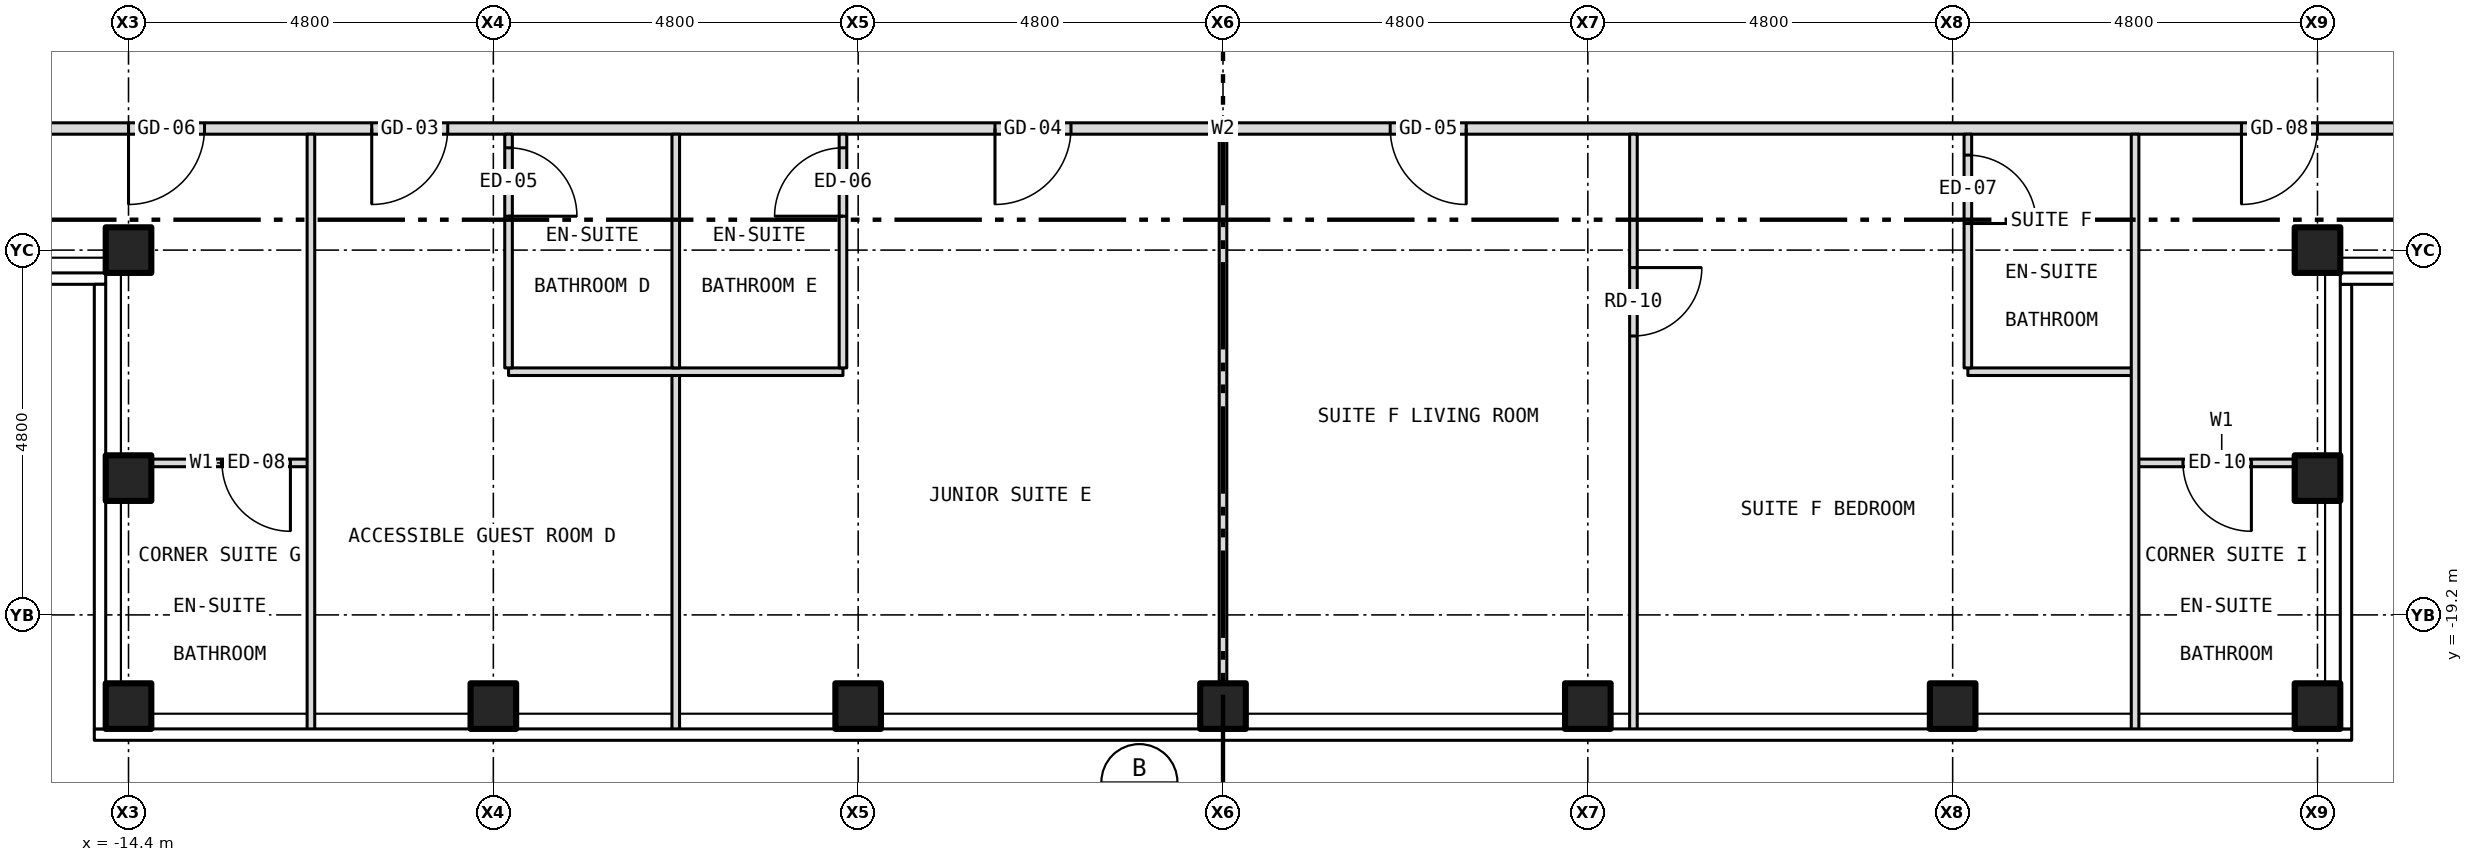
"""IFC4 building model, lengths in metres.
Left out: names, types, materials, properties, quantities, classifications, styles, units other than length and angle.
Written with IfcOpenShell. Run it as: python <this file> out.ifc"""

import sys

from ifc_helpers import new_model, si_unit, direction, frame, frame_2d, origin, origin_2d, place, context, subcontext, project, spatial, rectangle, hollow_rectangle, extrude, element, fill, save


model = new_model("IFC4")
c1 = context("Model", 3, precision=1e-05, world=origin(), true_north=direction((0.0, 1.0)))
c2 = subcontext(c1, "Body", "Model", "MODEL_VIEW")
j1 = project(units=[si_unit("LENGTHUNIT", "METRE"), si_unit("PLANEANGLEUNIT", "RADIAN")], contexts=[c1])
p1 = place(None, origin())
s1 = spatial("IfcSite", under=j1, at=p1, CompositionType="ELEMENT")
p2 = place(p1, origin())
s2 = spatial("IfcBuilding", under=s1, at=p2, CompositionType="ELEMENT")
p3 = place(p2, frame((0.0, 0.0, 241.0)))
s3 = spatial("IfcBuildingStorey", under=s2, at=p3, CompositionType="ELEMENT", Elevation=241.0)
for number, where, z_axis, x_axis in (
    (1, (-14.4, -20.4, -0.15), (0.0, 0.0, 1.0), (1.0, 0.0, 0.0)),
    (2, (-9.6, -20.4, -0.15), (0.0, 0.0, 1.0), (1.0, 0.0, 0.0)),
    (3, (-4.8, -20.4, -0.15), (0.0, 0.0, 1.0), (1.0, 0.0, 0.0)),
    (4, (0.0, -20.4, -0.15), (0.0, 0.0, 1.0), (1.0, 0.0, 0.0)),
    (5, (4.8, -20.4, -0.15), (0.0, 0.0, 1.0), (1.0, 0.0, 0.0)),
    (6, (9.6, -20.4, -0.15), (0.0, 0.0, 1.0), (1.0, 0.0, 0.0)),
    (7, (14.4, -20.4, -0.15), (0.0, 0.0, 1.0), (1.0, 0.0, 0.0)),
    (8, (-14.4, -14.4, -0.15), (0.0, 0.0, 1.0), (1.0, 0.0, 0.0)),
    (9, (-14.4, -17.4, -0.15), (0.0, 0.0, 1.0), (1.0, 0.0, 0.0)),
    (10, (14.4, -14.4, -0.15), (0.0, 0.0, 1.0), (1.0, 0.0, 0.0)),
    (11, (14.4, -17.4, -0.15), (0.0, 0.0, 1.0), (1.0, 0.0, 0.0)),
):
    element("IfcColumn", number, at=place(p3, frame(where, z_axis=z_axis, x_axis=x_axis)), inside=s3, PredefinedType="COLUMN", context=c2, shape_type="SweptSolid", body=[
        extrude(hollow_rectangle(XDim=0.6, YDim=0.6, WallThickness=0.03, at=origin_2d()), origin(), (0.0, 0.0, 1.0), 3.5),
    ])
p4 = place(p3, frame((-14.28, -17.2, 0.0), z_axis=(0.0, 0.0, 1.0), x_axis=(1.0, 0.0, 0.0)))
e12 = element("IfcWall", 12, at=p4, inside=s3, PredefinedType="PARTITIONING", context=c2, shape_type="SweptSolid", body=[
    extrude(rectangle(XDim=2.28, YDim=0.1, at=frame_2d((1.14, 0.0))), origin(), (0.0, 0.0, 1.0), 3.35),
])
p5 = place(p4, frame((1.11, 0.0, 0.0)))
e13 = element("IfcOpeningElement", 13, at=p5, cuts=e12, PredefinedType="OPENING", context=c2, shape_type="SweptSolid", body=[
    extrude(rectangle(XDim=0.9, YDim=2.1, at=frame_2d((0.45, 1.05))), frame((0.0, 0.062, 0.0), z_axis=(0.0, -1.0, 0.0), x_axis=(1.0, 0.0, 0.0)), (0.0, 0.0, 1.0), 0.124),
])
p6 = place(p3, frame((12.0, -17.2, 0.0), z_axis=(0.0, 0.0, 1.0), x_axis=(1.0, 0.0, 0.0)))
e14 = element("IfcWall", 14, at=p6, inside=s3, PredefinedType="PARTITIONING", context=c2, shape_type="SweptSolid", body=[
    extrude(rectangle(XDim=2.28, YDim=0.1, at=frame_2d((1.14, 0.0))), origin(), (0.0, 0.0, 1.0), 3.35),
])
p7 = place(p6, frame((0.63, 0.0, 0.0)))
e15 = element("IfcOpeningElement", 15, at=p7, cuts=e14, PredefinedType="OPENING", context=c2, shape_type="SweptSolid", body=[
    extrude(rectangle(XDim=0.9, YDim=2.1, at=frame_2d((0.45, 1.05))), frame((0.0, 0.062, 0.0), z_axis=(0.0, -1.0, 0.0), x_axis=(1.0, 0.0, 0.0)), (0.0, 0.0, 1.0), 0.124),
])
p8 = place(p3, frame((-9.4, -16.0, 0.0), z_axis=(0.0, 0.0, 1.0), x_axis=(1.0, 0.0, 0.0)))
e16 = element("IfcWall", 16, at=p8, inside=s3, PredefinedType="PARTITIONING", context=c2, shape_type="SweptSolid", body=[
    extrude(rectangle(XDim=4.4, YDim=0.1, at=frame_2d((2.2, 0.0))), origin(), (0.0, 0.0, 1.0), 3.35),
])
p9 = place(p3, frame((9.8, -16.0, 0.0), z_axis=(0.0, 0.0, 1.0), x_axis=(1.0, 0.0, 0.0)))
e17 = element("IfcWall", 17, at=p9, inside=s3, PredefinedType="PARTITIONING", context=c2, shape_type="SweptSolid", body=[
    extrude(rectangle(XDim=2.2, YDim=0.1, at=frame_2d((1.1, 0.0))), origin(), (0.0, 0.0, 1.0), 3.35),
])
p10 = place(p3, frame((-15.8, -12.8, 0.0), z_axis=(0.0, 0.0, 1.0), x_axis=(1.0, 0.0, 0.0)))
e18 = element("IfcWall", 18, at=p10, inside=s3, PredefinedType="PARTITIONING", context=c2, shape_type="SweptSolid", body=[
    extrude(rectangle(XDim=31.6, YDim=0.15, at=frame_2d((15.8, 0.0))), origin(), (0.0, 0.0, 1.0), 3.35),
])
p11 = place(p10, frame((4.6, 0.0, 0.0)))
e19 = element("IfcOpeningElement", 19, at=p11, cuts=e18, PredefinedType="OPENING", context=c2, shape_type="SweptSolid", body=[
    extrude(rectangle(XDim=1.0, YDim=2.1, at=frame_2d((0.5, 1.05))), frame((0.0, 0.087, 0.0), z_axis=(0.0, -1.0, 0.0), x_axis=(1.0, 0.0, 0.0)), (0.0, 0.0, 1.0), 0.174),
])
p12 = place(p10, frame((12.8, 0.0, 0.0)))
e20 = element("IfcOpeningElement", 20, at=p12, cuts=e18, PredefinedType="OPENING", context=c2, shape_type="SweptSolid", body=[
    extrude(rectangle(XDim=1.0, YDim=2.1, at=frame_2d((0.5, 1.05))), frame((0.0, 0.087, 0.0), z_axis=(0.0, -1.0, 0.0), x_axis=(1.0, 0.0, 0.0)), (0.0, 0.0, 1.0), 0.174),
])
p13 = place(p10, frame((18.0, 0.0, 0.0)))
e21 = element("IfcOpeningElement", 21, at=p13, cuts=e18, PredefinedType="OPENING", context=c2, shape_type="SweptSolid", body=[
    extrude(rectangle(XDim=1.0, YDim=2.1, at=frame_2d((0.5, 1.05))), frame((0.0, 0.087, 0.0), z_axis=(0.0, -1.0, 0.0), x_axis=(1.0, 0.0, 0.0)), (0.0, 0.0, 1.0), 0.174),
])
p14 = place(p10, frame((1.4, 0.0, 0.0)))
e22 = element("IfcOpeningElement", 22, at=p14, cuts=e18, PredefinedType="OPENING", context=c2, shape_type="SweptSolid", body=[
    extrude(rectangle(XDim=1.0, YDim=2.1, at=frame_2d((0.5, 1.05))), frame((0.0, 0.087, 0.0), z_axis=(0.0, -1.0, 0.0), x_axis=(1.0, 0.0, 0.0)), (0.0, 0.0, 1.0), 0.174),
])
p15 = place(p10, frame((29.2, 0.0, 0.0)))
e23 = element("IfcOpeningElement", 23, at=p15, cuts=e18, PredefinedType="OPENING", context=c2, shape_type="SweptSolid", body=[
    extrude(rectangle(XDim=1.0, YDim=2.1, at=frame_2d((0.5, 1.05))), frame((0.0, 0.087, 0.0), z_axis=(0.0, -1.0, 0.0), x_axis=(1.0, 0.0, 0.0)), (0.0, 0.0, 1.0), 0.174),
])
p16 = place(p3, frame((-12.0, -20.73, 0.0), z_axis=(0.0, 0.0, 1.0), x_axis=(0.0, 1.0, 0.0)))
e24 = element("IfcWall", 24, at=p16, inside=s3, PredefinedType="PARTITIONING", context=c2, shape_type="SweptSolid", body=[
    extrude(rectangle(XDim=7.855, YDim=0.1, at=frame_2d((3.927, 0.0))), origin(), (0.0, 0.0, 1.0), 3.35),
])
p17 = place(p3, frame((-9.4, -15.95, 0.0), z_axis=(0.0, 0.0, 1.0), x_axis=(0.0, 1.0, 0.0)))
e25 = element("IfcWall", 25, at=p17, inside=s3, PredefinedType="PARTITIONING", context=c2, shape_type="SweptSolid", body=[
    extrude(rectangle(XDim=3.075, YDim=0.1, at=frame_2d((1.538, 0.0))), origin(), (0.0, 0.0, 1.0), 2.728),
])
p18 = place(p17, frame((1.996, 0.0, 0.0)))
e26 = element("IfcOpeningElement", 26, at=p18, cuts=e25, PredefinedType="OPENING", context=c2, shape_type="SweptSolid", body=[
    extrude(rectangle(XDim=0.9, YDim=2.1, at=frame_2d((0.45, 1.05))), frame((0.0, 0.062, 0.0), z_axis=(0.0, -1.0, 0.0), x_axis=(1.0, 0.0, 0.0)), (0.0, 0.0, 1.0), 0.124),
])
p19 = place(p3, frame((-7.2, -20.73, 0.0), z_axis=(0.0, 0.0, 1.0), x_axis=(0.0, 1.0, 0.0)))
e27 = element("IfcWall", 27, at=p19, inside=s3, PredefinedType="PARTITIONING", context=c2, shape_type="SweptSolid", body=[
    extrude(rectangle(XDim=4.68, YDim=0.1, at=frame_2d((2.34, 0.0))), origin(), (0.0, 0.0, 1.0), 3.35),
])
p20 = place(p3, frame((-7.2, -15.95, 0.0), z_axis=(0.0, 0.0, 1.0), x_axis=(0.0, 1.0, 0.0)))
e28 = element("IfcWall", 28, at=p20, inside=s3, PredefinedType="PARTITIONING", context=c2, shape_type="SweptSolid", body=[
    extrude(rectangle(XDim=3.075, YDim=0.1, at=frame_2d((1.538, 0.0))), origin(), (0.0, 0.0, 1.0), 3.35),
])
p21 = place(p3, frame((-5.0, -15.95, 0.0), z_axis=(0.0, 0.0, 1.0), x_axis=(0.0, 1.0, 0.0)))
e29 = element("IfcWall", 29, at=p21, inside=s3, PredefinedType="PARTITIONING", context=c2, shape_type="SweptSolid", body=[
    extrude(rectangle(XDim=3.075, YDim=0.1, at=frame_2d((1.538, 0.0))), origin(), (0.0, 0.0, 1.0), 3.35),
])
p22 = place(p21, frame((1.996, 0.0, 0.0)))
e30 = element("IfcOpeningElement", 30, at=p22, cuts=e29, PredefinedType="OPENING", context=c2, shape_type="SweptSolid", body=[
    extrude(rectangle(XDim=0.9, YDim=2.1, at=frame_2d((0.45, 1.05))), frame((0.0, 0.062, 0.0), z_axis=(0.0, -1.0, 0.0), x_axis=(1.0, 0.0, 0.0)), (0.0, 0.0, 1.0), 0.124),
])
p23 = place(p3, frame((0.0, -20.28, 0.0), z_axis=(0.0, 0.0, 1.0), x_axis=(0.0, 1.0, 0.0)))
e31 = element("IfcWall", 31, at=p23, inside=s3, PredefinedType="PARTITIONING", context=c2, shape_type="SweptSolid", body=[
    extrude(rectangle(XDim=7.405, YDim=0.1, at=frame_2d((3.703, 0.0))), origin(), (0.0, 0.0, 1.0), 2.728),
])
p24 = place(p3, frame((5.4, -20.73, 0.0), z_axis=(0.0, 0.0, 1.0), x_axis=(0.0, 1.0, 0.0)))
e32 = element("IfcWall", 32, at=p24, inside=s3, PredefinedType="PARTITIONING", context=c2, shape_type="SweptSolid", body=[
    extrude(rectangle(XDim=7.855, YDim=0.1, at=frame_2d((3.927, 0.0))), origin(), (0.0, 0.0, 1.0), 3.35),
])
p25 = place(p24, frame((5.2, 0.0, 0.0)))
e33 = element("IfcOpeningElement", 33, at=p25, cuts=e32, PredefinedType="OPENING", context=c2, shape_type="SweptSolid", body=[
    extrude(rectangle(XDim=0.9, YDim=2.1, at=frame_2d((0.45, 1.05))), frame((0.0, 0.062, 0.0), z_axis=(0.0, -1.0, 0.0), x_axis=(1.0, 0.0, 0.0)), (0.0, 0.0, 1.0), 0.124),
])
p26 = place(p3, frame((9.8, -15.95, 0.0), z_axis=(0.0, 0.0, 1.0), x_axis=(0.0, 1.0, 0.0)))
e34 = element("IfcWall", 34, at=p26, inside=s3, PredefinedType="PARTITIONING", context=c2, shape_type="SweptSolid", body=[
    extrude(rectangle(XDim=3.075, YDim=0.1, at=frame_2d((1.538, 0.0))), origin(), (0.0, 0.0, 1.0), 2.728),
])
p27 = place(p26, frame((1.9, 0.0, 0.0)))
e35 = element("IfcOpeningElement", 35, at=p27, cuts=e34, PredefinedType="OPENING", context=c2, shape_type="SweptSolid", body=[
    extrude(rectangle(XDim=0.9, YDim=2.1, at=frame_2d((0.45, 1.05))), frame((0.0, 0.062, 0.0), z_axis=(0.0, -1.0, 0.0), x_axis=(1.0, 0.0, 0.0)), (0.0, 0.0, 1.0), 0.124),
])
p28 = place(p3, frame((12.0, -20.73, 0.0), z_axis=(0.0, 0.0, 1.0), x_axis=(0.0, 1.0, 0.0)))
e36 = element("IfcWall", 36, at=p28, inside=s3, PredefinedType="PARTITIONING", context=c2, shape_type="SweptSolid", body=[
    extrude(rectangle(XDim=7.855, YDim=0.1, at=frame_2d((3.927, 0.0))), origin(), (0.0, 0.0, 1.0), 3.35),
])
p29 = place(p11, origin())
e37 = element("IfcDoor", 37, at=p29, inside=s3, OperationType="SINGLE_SWING_LEFT", PredefinedType="DOOR", context=c2, shape_type="SweptSolid", body=[
    extrude(rectangle(XDim=1.0, YDim=2.1, at=frame_2d((0.5, 1.05))), frame((0.0, 0.025, 0.0), z_axis=(0.0, -1.0, 0.0), x_axis=(1.0, 0.0, 0.0)), (0.0, 0.0, 1.0), 0.05),
])
fill(e19, e37)
p30 = place(p18, origin())
e38 = element("IfcDoor", 38, at=p30, inside=s3, OperationType="SINGLE_SWING_LEFT", PredefinedType="DOOR", context=c2, shape_type="SweptSolid", body=[
    extrude(rectangle(XDim=0.9, YDim=2.1, at=frame_2d((0.45, 1.05))), frame((0.0, 0.025, 0.0), z_axis=(0.0, -1.0, 0.0), x_axis=(1.0, 0.0, 0.0)), (0.0, 0.0, 1.0), 0.05),
])
fill(e26, e38)
p31 = place(p12, origin())
e39 = element("IfcDoor", 39, at=p31, inside=s3, OperationType="SINGLE_SWING_LEFT", PredefinedType="DOOR", context=c2, shape_type="SweptSolid", body=[
    extrude(rectangle(XDim=1.0, YDim=2.1, at=frame_2d((0.5, 1.05))), frame((0.0, 0.025, 0.0), z_axis=(0.0, -1.0, 0.0), x_axis=(1.0, 0.0, 0.0)), (0.0, 0.0, 1.0), 0.05),
])
fill(e20, e39)
p32 = place(p22, origin())
e40 = element("IfcDoor", 40, at=p32, inside=s3, OperationType="SINGLE_SWING_LEFT", PredefinedType="DOOR", context=c2, shape_type="SweptSolid", body=[
    extrude(rectangle(XDim=0.9, YDim=2.1, at=frame_2d((0.45, 1.05))), frame((0.0, 0.025, 0.0), z_axis=(0.0, -1.0, 0.0), x_axis=(1.0, 0.0, 0.0)), (0.0, 0.0, 1.0), 0.05),
])
fill(e30, e40)
p33 = place(p13, origin())
e41 = element("IfcDoor", 41, at=p33, inside=s3, OperationType="SINGLE_SWING_RIGHT", PredefinedType="DOOR", context=c2, shape_type="SweptSolid", body=[
    extrude(rectangle(XDim=1.0, YDim=2.1, at=frame_2d((0.5, 1.05))), frame((0.0, 0.025, 0.0), z_axis=(0.0, -1.0, 0.0), x_axis=(1.0, 0.0, 0.0)), (0.0, 0.0, 1.0), 0.05),
])
fill(e21, e41)
p34 = place(p25, origin())
e42 = element("IfcDoor", 42, at=p34, inside=s3, OperationType="SINGLE_SWING_RIGHT", PredefinedType="DOOR", context=c2, shape_type="SweptSolid", body=[
    extrude(rectangle(XDim=0.9, YDim=2.1, at=frame_2d((0.45, 1.05))), frame((0.0, 0.025, 0.0), z_axis=(0.0, -1.0, 0.0), x_axis=(1.0, 0.0, 0.0)), (0.0, 0.0, 1.0), 0.05),
])
fill(e33, e42)
p35 = place(p27, origin())
e43 = element("IfcDoor", 43, at=p35, inside=s3, OperationType="SINGLE_SWING_LEFT", PredefinedType="DOOR", context=c2, shape_type="SweptSolid", body=[
    extrude(rectangle(XDim=0.9, YDim=2.1, at=frame_2d((0.45, 1.05))), frame((0.0, 0.025, 0.0), z_axis=(0.0, -1.0, 0.0), x_axis=(1.0, 0.0, 0.0)), (0.0, 0.0, 1.0), 0.05),
])
fill(e35, e43)
p36 = place(p5, origin())
e44 = element("IfcDoor", 44, at=p36, inside=s3, OperationType="SINGLE_SWING_RIGHT", PredefinedType="DOOR", context=c2, shape_type="SweptSolid", body=[
    extrude(rectangle(XDim=0.9, YDim=2.1, at=frame_2d((0.45, 1.05))), frame((0.0, 0.025, 0.0), z_axis=(0.0, -1.0, 0.0), x_axis=(1.0, 0.0, 0.0)), (0.0, 0.0, 1.0), 0.05),
])
fill(e13, e44)
p37 = place(p14, origin())
e45 = element("IfcDoor", 45, at=p37, inside=s3, OperationType="SINGLE_SWING_LEFT", PredefinedType="DOOR", context=c2, shape_type="SweptSolid", body=[
    extrude(rectangle(XDim=1.0, YDim=2.1, at=frame_2d((0.5, 1.05))), frame((0.0, 0.025, 0.0), z_axis=(0.0, -1.0, 0.0), x_axis=(1.0, 0.0, 0.0)), (0.0, 0.0, 1.0), 0.05),
])
fill(e22, e45)
p38 = place(p7, origin())
e46 = element("IfcDoor", 46, at=p38, inside=s3, OperationType="SINGLE_SWING_RIGHT", PredefinedType="DOOR", context=c2, shape_type="SweptSolid", body=[
    extrude(rectangle(XDim=0.9, YDim=2.1, at=frame_2d((0.45, 1.05))), frame((0.0, 0.025, 0.0), z_axis=(0.0, -1.0, 0.0), x_axis=(1.0, 0.0, 0.0)), (0.0, 0.0, 1.0), 0.05),
])
fill(e15, e46)
p39 = place(p15, origin())
e47 = element("IfcDoor", 47, at=p39, inside=s3, OperationType="SINGLE_SWING_LEFT", PredefinedType="DOOR", context=c2, shape_type="SweptSolid", body=[
    extrude(rectangle(XDim=1.0, YDim=2.1, at=frame_2d((0.5, 1.05))), frame((0.0, 0.025, 0.0), z_axis=(0.0, -1.0, 0.0), x_axis=(1.0, 0.0, 0.0)), (0.0, 0.0, 1.0), 0.05),
])
fill(e23, e47)
save(model, sys.argv[1])
